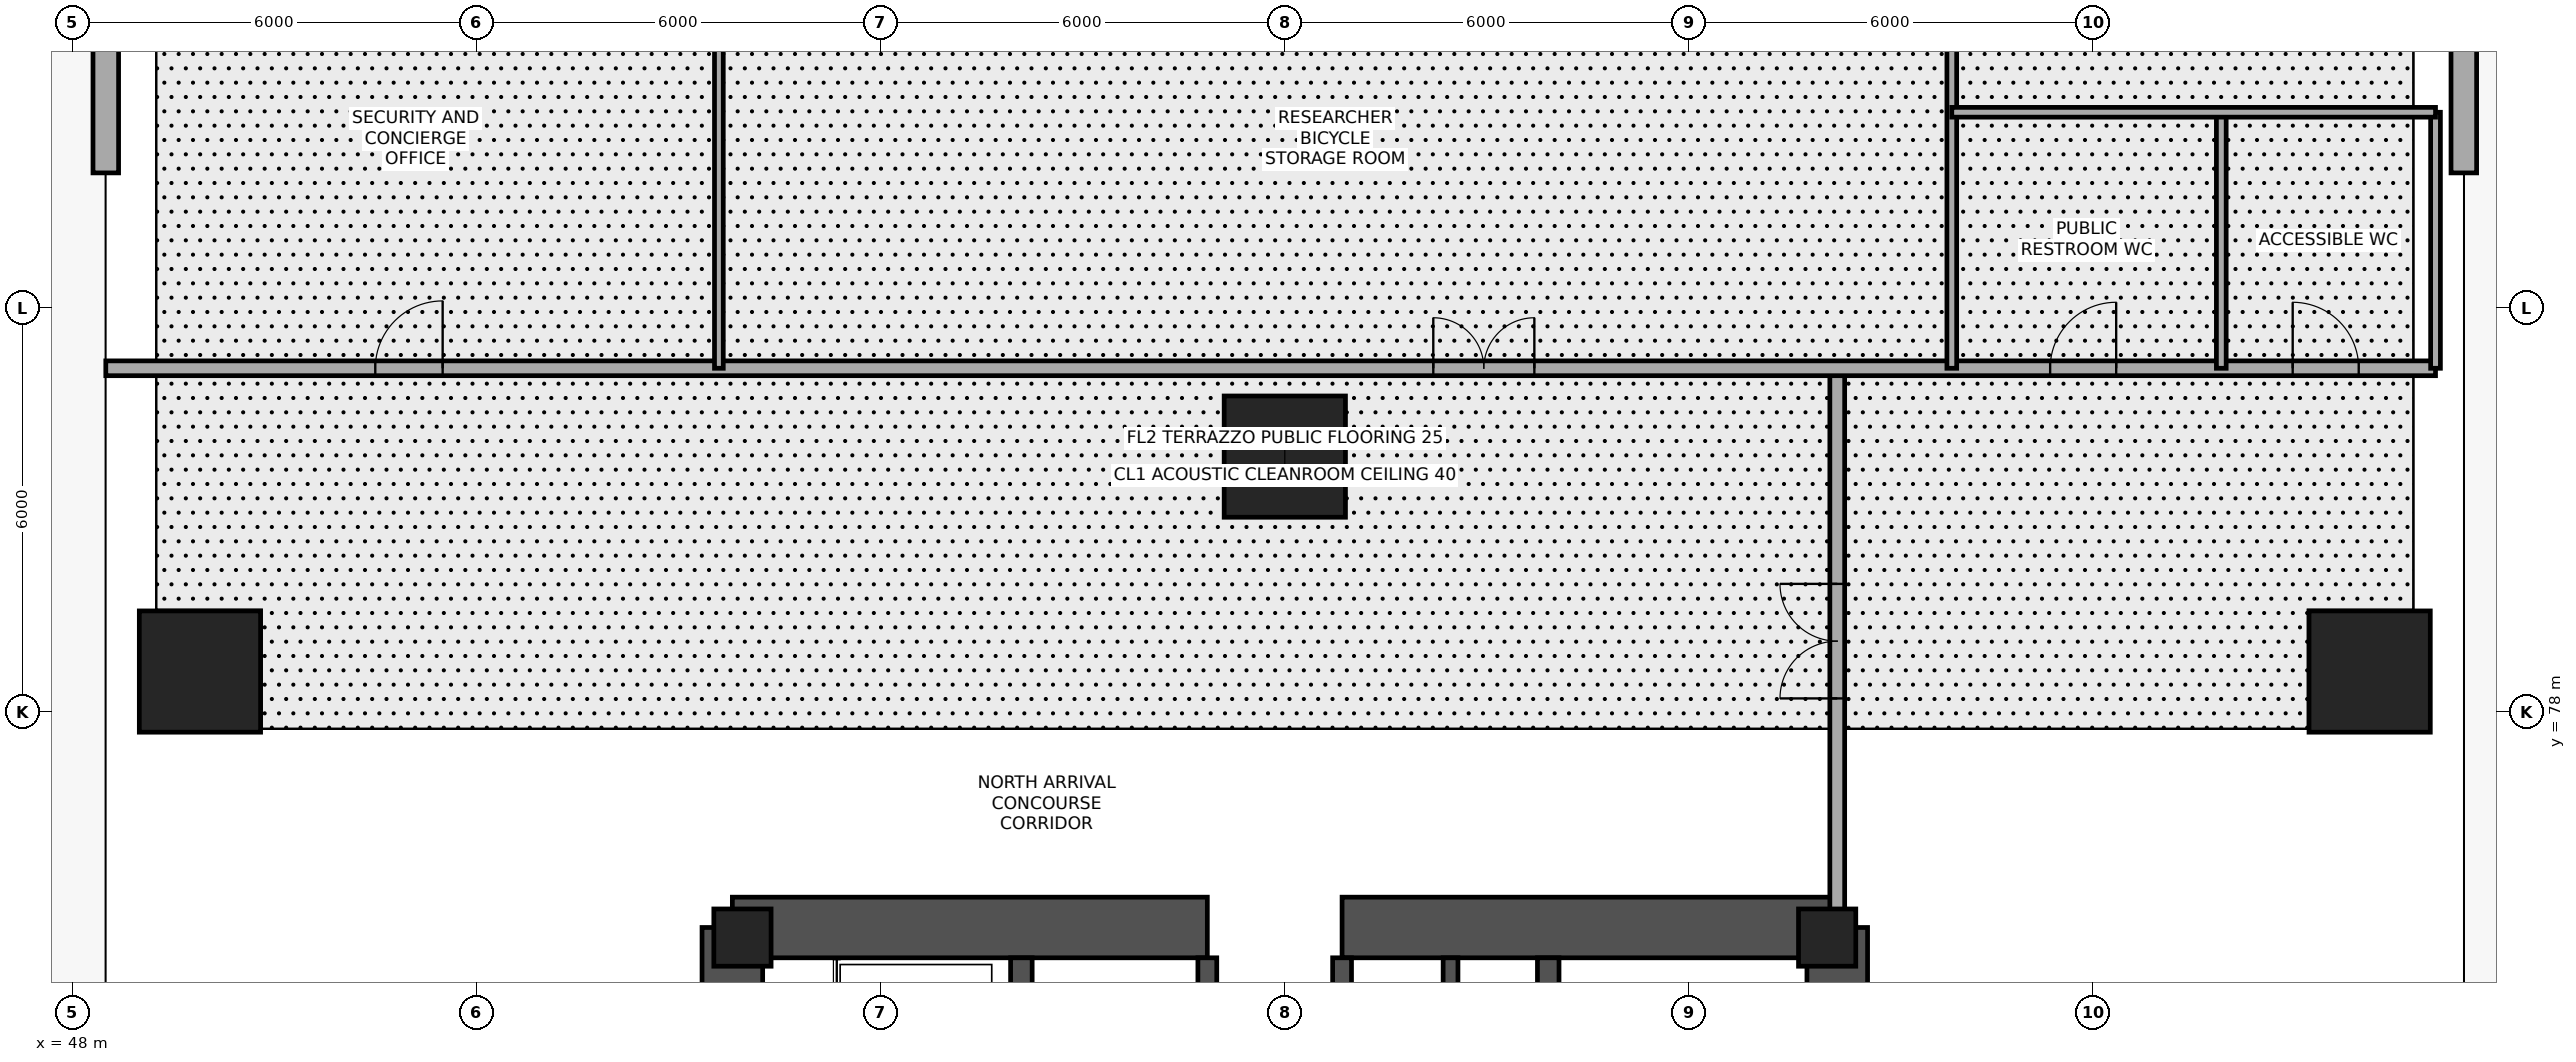
"""IFC4 building model, lengths in metres.
Left out: names, types, materials, properties, quantities, classifications, styles, units other than length and angle.
Written with IfcOpenShell. Run it as: python <this file> out.ifc"""

import sys

from ifc_helpers import new_model, si_unit, direction, frame, frame_2d, origin, origin_2d, place, context, subcontext, project, spatial, rectangle, extrude, element, fill, save


model = new_model("IFC4")
c1 = context("Model", 3, precision=1e-05, world=origin(), true_north=direction((0.0, 1.0)))
c2 = subcontext(c1, "Body", "Model", "MODEL_VIEW")
j1 = project(units=[si_unit("LENGTHUNIT", "METRE"), si_unit("PLANEANGLEUNIT", "RADIAN")], contexts=[c1])
p1 = place(None, origin())
s1 = spatial("IfcSite", under=j1, at=p1, CompositionType="ELEMENT")
p2 = place(p1, origin())
s2 = spatial("IfcBuilding", under=s1, at=p2, CompositionType="ELEMENT")
p3 = place(p2, origin())
s3 = spatial("IfcBuildingStorey", under=s2, at=p3, CompositionType="ELEMENT", Elevation=0.0)
p4 = place(p3, frame((74.2, 61.2, 0.0), z_axis=(0.0, 0.0, 1.0), x_axis=(0.0, 1.0, 0.0)))
e1 = element("IfcWall", 1, at=p4, inside=s3, PredefinedType="SHEAR", context=c2, shape_type="SweptSolid", body=[
    extrude(rectangle(XDim=13.6, YDim=0.9, at=frame_2d((6.8, 0.0))), origin(), (0.0, 0.0, 1.0), 5.4),
])
p5 = place(p3, frame((74.2, 74.8, 0.0), z_axis=(0.0, 0.0, 1.0), x_axis=(-1.0, 0.0, 0.0)))
e2 = element("IfcWall", 2, at=p5, inside=s3, PredefinedType="SHEAR", context=c2, shape_type="SweptSolid", body=[
    extrude(rectangle(XDim=7.35, YDim=0.9, at=frame_2d((3.675, 0.0))), origin(), (0.0, 0.0, 1.0), 5.4),
])
p6 = place(p3, frame((64.85, 74.8, 0.0), z_axis=(0.0, 0.0, 1.0), x_axis=(-1.0, 0.0, 0.0)))
e3 = element("IfcWall", 3, at=p6, inside=s3, PredefinedType="SHEAR", context=c2, shape_type="SweptSolid", body=[
    extrude(rectangle(XDim=7.05, YDim=0.9, at=frame_2d((3.525, 0.0))), origin(), (0.0, 0.0, 1.0), 5.4),
])
p7 = place(p3, frame((57.8, 74.8, 0.0), z_axis=(0.0, 0.0, 1.0), x_axis=(0.0, -1.0, 0.0)))
e4 = element("IfcWall", 4, at=p7, inside=s3, PredefinedType="SHEAR", context=c2, shape_type="SweptSolid", body=[
    extrude(rectangle(XDim=13.6, YDim=0.9, at=frame_2d((6.8, 0.0))), origin(), (0.0, 0.0, 1.0), 5.4),
])
p8 = place(p7, frame((0.85, 0.0, 0.0)))
e5 = element("IfcOpeningElement", 5, at=p8, cuts=e4, PredefinedType="OPENING", context=c2, shape_type="SweptSolid", body=[
    extrude(rectangle(XDim=0.92, YDim=2.05, at=frame_2d((0.46, 1.025))), frame((0.0, 0.46, 0.0), z_axis=(0.0, -1.0, 0.0), x_axis=(1.0, 0.0, 0.0)), (0.0, 0.0, 1.0), 0.92),
])
p9 = place(p7, frame((2.55, 0.0, 0.0)))
e6 = element("IfcOpeningElement", 6, at=p9, cuts=e4, PredefinedType="OPENING", context=c2, shape_type="SweptSolid", body=[
    extrude(rectangle(XDim=1.6, YDim=2.3, at=frame_2d((0.8, 1.15))), frame((0.0, 0.46, 0.0), z_axis=(0.0, -1.0, 0.0), x_axis=(1.0, 0.0, 0.0)), (0.0, 0.0, 1.0), 0.92),
])
p10 = place(p3, frame((62.09, 61.65, 0.0), z_axis=(0.0, 0.0, 1.0), x_axis=(0.0, 1.0, 0.0)))
e7 = element("IfcWall", 7, at=p10, inside=s3, PredefinedType="SHEAR", context=c2, shape_type="SweptSolid", body=[
    extrude(rectangle(XDim=12.7, YDim=0.32, at=frame_2d((6.35, 0.0))), origin(), (0.0, 0.0, 1.0), 5.4),
])
p11 = place(p10, frame((0.55, 0.0, 0.0)))
e8 = element("IfcOpeningElement", 8, at=p11, cuts=e7, PredefinedType="OPENING", context=c2, shape_type="SweptSolid", body=[
    extrude(rectangle(XDim=1.15, YDim=2.15, at=frame_2d((0.575, 1.075))), frame((0.0, 0.17, 0.0), z_axis=(0.0, -1.0, 0.0), x_axis=(1.0, 0.0, 0.0)), (0.0, 0.0, 1.0), 0.34),
])
p12 = place(p3, frame((69.91, 61.65, 0.0), z_axis=(0.0, 0.0, 1.0), x_axis=(0.0, 1.0, 0.0)))
e9 = element("IfcWall", 9, at=p12, inside=s3, PredefinedType="SHEAR", context=c2, shape_type="SweptSolid", body=[
    extrude(rectangle(XDim=12.7, YDim=0.32, at=frame_2d((6.35, 0.0))), origin(), (0.0, 0.0, 1.0), 5.4),
])
p13 = place(p12, frame((8.75, 0.0, 0.0)))
e10 = element("IfcOpeningElement", 10, at=p13, cuts=e9, PredefinedType="OPENING", context=c2, shape_type="SweptSolid", body=[
    extrude(rectangle(XDim=0.92, YDim=2.05, at=frame_2d((0.46, 1.025))), frame((0.0, 0.17, 0.0), z_axis=(0.0, -1.0, 0.0), x_axis=(1.0, 0.0, 0.0)), (0.0, 0.0, 1.0), 0.34),
])
for number, where, z_axis, x_axis in (
    (11, (64.85, 72.25, 0.0), (0.0, 0.0, 1.0), (0.0, 1.0, 0.0)),
    (12, (66.85, 72.25, 0.0), (0.0, 0.0, 1.0), (0.0, 1.0, 0.0)),
):
    element("IfcWall", number, at=place(p3, frame(where, z_axis=z_axis, x_axis=x_axis)), inside=s3, PredefinedType="SHEAR", context=c2, shape_type="SweptSolid", body=[
        extrude(rectangle(XDim=2.1, YDim=0.28, at=frame_2d((1.05, 0.0))), origin(), (0.0, 0.0, 1.0), 5.4),
    ])
p14 = place(p3, frame((68.46, 72.25, 0.0), z_axis=(0.0, 0.0, 1.0), x_axis=(0.0, 1.0, 0.0)))
e13 = element("IfcWall", 13, at=p14, inside=s3, PredefinedType="SHEAR", context=c2, shape_type="SweptSolid", body=[
    extrude(rectangle(XDim=2.1, YDim=0.22, at=frame_2d((1.05, 0.0))), origin(), (0.0, 0.0, 1.0), 5.4),
])
for number, where, z_axis, x_axis in (
    (14, (74.05, 74.65, 0.0), (0.0, 0.0, 1.0), (1.0, 0.0, 0.0)),
    (15, (57.95, 74.65, 0.0), (0.0, 0.0, 1.0), (1.0, 0.0, 0.0)),
):
    element("IfcColumn", number, at=place(p3, frame(where, z_axis=z_axis, x_axis=x_axis)), inside=s3, PredefinedType="COLUMN", context=c2, shape_type="SweptSolid", body=[
        extrude(rectangle(XDim=0.85, YDim=0.85, at=origin_2d()), origin(), (0.0, 0.0, 1.0), 5.4),
    ])
for number, where, z_axis, x_axis in (
    (16, (82.102, 78.599, 0.0), (0.0, 0.0, 1.0), (1.0, 0.0, 0.0)),
    (17, (49.898, 78.599, 0.0), (0.0, 0.0, 1.0), (1.0, 0.0, 0.0)),
    (18, (66.0, 81.789, 0.0), (0.0, 0.0, 1.0), (1.0, 0.0, 0.0)),
):
    element("IfcColumn", number, at=place(p3, frame(where, z_axis=z_axis, x_axis=x_axis)), inside=s3, PredefinedType="COLUMN", context=c2, shape_type="SweptSolid", body=[
        extrude(rectangle(XDim=1.8, YDim=1.8, at=origin_2d()), origin(), (0.0, 0.0, 1.0), 5.4),
    ])
for number, where, z_axis, x_axis in (
    (19, (83.5, 90.0, 0.0), (0.0, 0.0, 1.0), (0.0, -1.0, 0.0)),
    (20, (48.5, 86.0, 0.0), (0.0, 0.0, 1.0), (0.0, 1.0, 0.0)),
):
    element("IfcWall", number, at=place(p3, frame(where, z_axis=z_axis, x_axis=x_axis)), inside=s3, PredefinedType="STANDARD", context=c2, shape_type="SweptSolid", body=[
        extrude(rectangle(XDim=4.0, YDim=0.38, at=frame_2d((2.0, 0.0))), origin(), (0.0, 0.0, 1.0), 4.03),
    ])
p15 = place(p3, frame((74.2, 75.0, 0.0), z_axis=(0.0, 0.0, 1.0), x_axis=(0.0, 1.0, 0.0)))
e21 = element("IfcWall", 21, at=p15, inside=s3, PredefinedType="PARTITIONING", context=c2, shape_type="SweptSolid", body=[
    extrude(rectangle(XDim=8.1, YDim=0.22, at=frame_2d((4.05, 0.0))), origin(), (0.0, 0.0, 1.0), 4.08),
])
p16 = place(p15, frame((3.2, 0.0, 0.0)))
e22 = element("IfcOpeningElement", 22, at=p16, cuts=e21, PredefinedType="OPENING", context=c2, shape_type="SweptSolid", body=[
    extrude(rectangle(XDim=1.7, YDim=2.2, at=frame_2d((0.85, 1.1))), frame((0.0, 0.12, 0.0), z_axis=(0.0, -1.0, 0.0), x_axis=(1.0, 0.0, 0.0)), (0.0, 0.0, 1.0), 0.24),
])
p17 = place(p3, frame((48.5, 83.1, 0.0), z_axis=(0.0, 0.0, 1.0), x_axis=(1.0, 0.0, 0.0)))
e23 = element("IfcWall", 23, at=p17, inside=s3, PredefinedType="PARTITIONING", context=c2, shape_type="SweptSolid", body=[
    extrude(rectangle(XDim=34.58, YDim=0.22, at=frame_2d((17.29, 0.0))), origin(), (0.0, 0.0, 1.0), 4.03),
])
p18 = place(p17, frame((4.0, 0.0, 0.0)))
e24 = element("IfcOpeningElement", 24, at=p18, cuts=e23, PredefinedType="OPENING", context=c2, shape_type="SweptSolid", body=[
    extrude(rectangle(XDim=1.0, YDim=2.1, at=frame_2d((0.5, 1.05))), frame((0.0, 0.12, 0.0), z_axis=(0.0, -1.0, 0.0), x_axis=(1.0, 0.0, 0.0)), (0.0, 0.0, 1.0), 0.24),
])
p19 = place(p17, frame((19.704, 0.0, 0.0)))
e25 = element("IfcOpeningElement", 25, at=p19, cuts=e23, PredefinedType="OPENING", context=c2, shape_type="SweptSolid", body=[
    extrude(rectangle(XDim=1.5, YDim=2.2, at=frame_2d((0.75, 1.1))), frame((0.0, 0.12, 0.0), z_axis=(0.0, -1.0, 0.0), x_axis=(1.0, 0.0, 0.0)), (0.0, 0.0, 1.0), 0.24),
])
p20 = place(p17, frame((28.86, 0.0, 0.0)))
e26 = element("IfcOpeningElement", 26, at=p20, cuts=e23, PredefinedType="OPENING", context=c2, shape_type="SweptSolid", body=[
    extrude(rectangle(XDim=0.98, YDim=2.1, at=frame_2d((0.49, 1.05))), frame((0.0, 0.12, 0.0), z_axis=(0.0, -1.0, 0.0), x_axis=(1.0, 0.0, 0.0)), (0.0, 0.0, 1.0), 0.24),
])
p21 = place(p17, frame((32.46, 0.0, 0.0)))
e27 = element("IfcOpeningElement", 27, at=p21, cuts=e23, PredefinedType="OPENING", context=c2, shape_type="SweptSolid", body=[
    extrude(rectangle(XDim=0.98, YDim=2.1, at=frame_2d((0.49, 1.05))), frame((0.0, 0.12, 0.0), z_axis=(0.0, -1.0, 0.0), x_axis=(1.0, 0.0, 0.0)), (0.0, 0.0, 1.0), 0.24),
])
p22 = place(p3, frame((57.6, 83.1, 0.0), z_axis=(0.0, 0.0, 1.0), x_axis=(0.0, 1.0, 0.0)))
e28 = element("IfcWall", 28, at=p22, inside=s3, PredefinedType="PARTITIONING", context=c2, shape_type="SweptSolid", body=[
    extrude(rectangle(XDim=6.9, YDim=0.13, at=frame_2d((3.45, 0.0))), origin(), (0.0, 0.0, 1.0), 5.0),
])
p23 = place(p3, frame((75.9, 83.1, 0.0), z_axis=(0.0, 0.0, 1.0), x_axis=(0.0, 1.0, 0.0)))
e29 = element("IfcWall", 29, at=p23, inside=s3, PredefinedType="PARTITIONING", context=c2, shape_type="SweptSolid", body=[
    extrude(rectangle(XDim=6.9, YDim=0.145, at=frame_2d((3.45, 0.0))), origin(), (0.0, 0.0, 1.0), 5.0),
])
p24 = place(p3, frame((79.9, 83.1, 0.0), z_axis=(0.0, 0.0, 1.0), x_axis=(0.0, 1.0, 0.0)))
e30 = element("IfcWall", 30, at=p24, inside=s3, PredefinedType="PARTITIONING", context=c2, shape_type="SweptSolid", body=[
    extrude(rectangle(XDim=3.8, YDim=0.145, at=frame_2d((1.9, 0.0))), origin(), (0.0, 0.0, 1.0), 5.0),
])
p25 = place(p3, frame((83.08, 83.1, 0.0), z_axis=(0.0, 0.0, 1.0), x_axis=(0.0, 1.0, 0.0)))
e31 = element("IfcWall", 31, at=p25, inside=s3, PredefinedType="PARTITIONING", context=c2, shape_type="SweptSolid", body=[
    extrude(rectangle(XDim=3.8, YDim=0.145, at=frame_2d((1.9, 0.0))), origin(), (0.0, 0.0, 1.0), 4.03),
])
p26 = place(p3, frame((75.9, 86.9, 0.0), z_axis=(0.0, 0.0, 1.0), x_axis=(1.0, 0.0, 0.0)))
e32 = element("IfcWall", 32, at=p26, inside=s3, PredefinedType="PARTITIONING", context=c2, shape_type="SweptSolid", body=[
    extrude(rectangle(XDim=7.18, YDim=0.145, at=frame_2d((3.59, 0.0))), origin(), (0.0, 0.0, 1.0), 4.03),
])
p27 = place(p16, origin())
e33 = element("IfcDoor", 33, at=p27, inside=s3, OperationType="DOUBLE_DOOR_SINGLE_SWING", PredefinedType="DOOR", context=c2, shape_type="SweptSolid", body=[
    extrude(rectangle(XDim=1.7, YDim=2.2, at=frame_2d((0.85, 1.1))), frame((0.0, 0.025, 0.0), z_axis=(0.0, -1.0, 0.0), x_axis=(1.0, 0.0, 0.0)), (0.0, 0.0, 1.0), 0.05),
])
fill(e22, e33)
p28 = place(p18, origin())
e34 = element("IfcDoor", 34, at=p28, inside=s3, OperationType="SINGLE_SWING_RIGHT", PredefinedType="DOOR", context=c2, shape_type="SweptSolid", body=[
    extrude(rectangle(XDim=1.0, YDim=2.1, at=frame_2d((0.5, 1.05))), frame((0.0, 0.025, 0.0), z_axis=(0.0, -1.0, 0.0), x_axis=(1.0, 0.0, 0.0)), (0.0, 0.0, 1.0), 0.05),
])
fill(e24, e34)
p29 = place(p19, origin())
e35 = element("IfcDoor", 35, at=p29, inside=s3, OperationType="DOUBLE_DOOR_SINGLE_SWING", PredefinedType="DOOR", context=c2, shape_type="SweptSolid", body=[
    extrude(rectangle(XDim=1.5, YDim=2.2, at=frame_2d((0.75, 1.1))), frame((0.0, 0.025, 0.0), z_axis=(0.0, -1.0, 0.0), x_axis=(1.0, 0.0, 0.0)), (0.0, 0.0, 1.0), 0.05),
])
fill(e25, e35)
p30 = place(p20, origin())
e36 = element("IfcDoor", 36, at=p30, inside=s3, OperationType="SINGLE_SWING_RIGHT", PredefinedType="DOOR", context=c2, shape_type="SweptSolid", body=[
    extrude(rectangle(XDim=0.98, YDim=2.1, at=frame_2d((0.49, 1.05))), frame((0.0, 0.025, 0.0), z_axis=(0.0, -1.0, 0.0), x_axis=(1.0, 0.0, 0.0)), (0.0, 0.0, 1.0), 0.05),
])
fill(e26, e36)
p31 = place(p21, origin())
e37 = element("IfcDoor", 37, at=p31, inside=s3, OperationType="SINGLE_SWING_LEFT", PredefinedType="DOOR", context=c2, shape_type="SweptSolid", body=[
    extrude(rectangle(XDim=0.98, YDim=2.1, at=frame_2d((0.49, 1.05))), frame((0.0, 0.025, 0.0), z_axis=(0.0, -1.0, 0.0), x_axis=(1.0, 0.0, 0.0)), (0.0, 0.0, 1.0), 0.05),
])
fill(e27, e37)
save(model, sys.argv[1])
